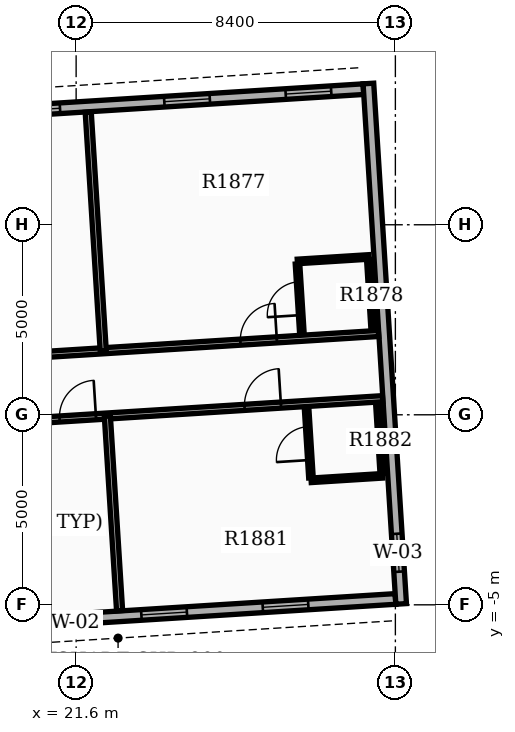
"""IFC4 building model, lengths in metres.
Left out: names, types, materials, properties, quantities, classifications, styles, units other than length and angle.
Written with IfcOpenShell. Run it as: python <this file> out.ifc"""

import sys

from ifc_helpers import new_model, si_unit, direction, frame, frame_2d, origin, place, context, subcontext, project, spatial, rectangle, extrude, element, fill, save


model = new_model("IFC4")
c1 = context("Model", 3, precision=1e-05, world=origin(), true_north=direction((0.0, 1.0)))
c2 = subcontext(c1, "Body", "Model", "MODEL_VIEW")
j1 = project(units=[si_unit("LENGTHUNIT", "METRE"), si_unit("PLANEANGLEUNIT", "RADIAN")], contexts=[c1])
p1 = place(None, origin())
s1 = spatial("IfcSite", under=j1, at=p1, CompositionType="ELEMENT")
p2 = place(p1, origin())
s2 = spatial("IfcBuilding", under=s1, at=p2, CompositionType="ELEMENT")
p3 = place(p2, frame((0.0, 0.0, 120.3)))
s3 = spatial("IfcBuildingStorey", under=s2, at=p3, CompositionType="ELEMENT", Elevation=120.3)
p4 = place(p3, frame((15.333, -5.769, 0.0), z_axis=(0.0, 0.0, 1.0), x_axis=(0.998027423805, 0.062779465852, 0.0)))
e1 = element("IfcWall", 1, at=p4, inside=s3, PredefinedType="STANDARD", context=c2, shape_type="SweptSolid", body=[
    extrude(rectangle(XDim=14.7, YDim=0.28, at=frame_2d((7.35, 0.0))), origin(), (0.0, 0.0, 1.0), 2.97),
])
p5 = place(p4, frame((4.05, 0.0, 0.8)))
e2 = element("IfcOpeningElement", 2, at=p5, cuts=e1, PredefinedType="OPENING", context=c2, shape_type="SweptSolid", body=[
    extrude(rectangle(XDim=1.2, YDim=1.6, at=frame_2d((0.6, 0.8))), frame((0.0, 0.15, 0.0), z_axis=(0.0, -1.0, 0.0), x_axis=(1.0, 0.0, 0.0)), (0.0, 0.0, 1.0), 0.3),
])
p6 = place(p4, frame((8.0, 0.0, 0.8)))
e3 = element("IfcOpeningElement", 3, at=p6, cuts=e1, PredefinedType="OPENING", context=c2, shape_type="SweptSolid", body=[
    extrude(rectangle(XDim=1.2, YDim=1.6, at=frame_2d((0.6, 0.8))), frame((0.0, 0.15, 0.0), z_axis=(0.0, -1.0, 0.0), x_axis=(1.0, 0.0, 0.0)), (0.0, 0.0, 1.0), 0.3),
])
p7 = place(p4, frame((11.2, 0.0, 0.8)))
e4 = element("IfcOpeningElement", 4, at=p7, cuts=e1, PredefinedType="OPENING", context=c2, shape_type="SweptSolid", body=[
    extrude(rectangle(XDim=1.2, YDim=1.6, at=frame_2d((0.6, 0.8))), frame((0.0, 0.15, 0.0), z_axis=(0.0, -1.0, 0.0), x_axis=(1.0, 0.0, 0.0)), (0.0, 0.0, 1.0), 0.3),
])
p8 = place(p4, frame((0.3, 0.0, 0.0)))
e5 = element("IfcOpeningElement", 5, at=p8, cuts=e1, PredefinedType="OPENING", context=c2, shape_type="SweptSolid", body=[
    extrude(rectangle(XDim=0.96, YDim=2.1, at=frame_2d((0.48, 1.05))), frame((0.0, 0.15, 0.0), z_axis=(0.0, -1.0, 0.0), x_axis=(1.0, 0.0, 0.0)), (0.0, 0.0, 1.0), 0.3),
])
p9 = place(p3, frame((29.16, 8.568, 0.0), z_axis=(0.0, 0.0, 1.0), x_axis=(-0.998026448555, -0.062794967833, 0.0)))
e6 = element("IfcWall", 6, at=p9, inside=s3, PredefinedType="STANDARD", context=c2, shape_type="SweptSolid", body=[
    extrude(rectangle(XDim=14.7, YDim=0.28, at=frame_2d((7.35, 0.0))), origin(), (0.0, 0.0, 1.0), 2.97),
])
p10 = place(p9, frame((0.85, 0.0, 0.8)))
e7 = element("IfcOpeningElement", 7, at=p10, cuts=e6, PredefinedType="OPENING", context=c2, shape_type="SweptSolid", body=[
    extrude(rectangle(XDim=1.2, YDim=1.6, at=frame_2d((0.6, 0.8))), frame((0.0, 0.15, 0.0), z_axis=(0.0, -1.0, 0.0), x_axis=(1.0, 0.0, 0.0)), (0.0, 0.0, 1.0), 0.3),
])
p11 = place(p9, frame((4.05, 0.0, 0.8)))
e8 = element("IfcOpeningElement", 8, at=p11, cuts=e6, PredefinedType="OPENING", context=c2, shape_type="SweptSolid", body=[
    extrude(rectangle(XDim=1.2, YDim=1.6, at=frame_2d((0.6, 0.8))), frame((0.0, 0.15, 0.0), z_axis=(0.0, -1.0, 0.0), x_axis=(1.0, 0.0, 0.0)), (0.0, 0.0, 1.0), 0.3),
])
p12 = place(p9, frame((8.0, 0.0, 0.8)))
e9 = element("IfcOpeningElement", 9, at=p12, cuts=e6, PredefinedType="OPENING", context=c2, shape_type="SweptSolid", body=[
    extrude(rectangle(XDim=1.2, YDim=1.6, at=frame_2d((0.6, 0.8))), frame((0.0, 0.15, 0.0), z_axis=(0.0, -1.0, 0.0), x_axis=(1.0, 0.0, 0.0)), (0.0, 0.0, 1.0), 0.3),
])
p13 = place(p9, frame((11.2, 0.0, 0.8)))
e10 = element("IfcOpeningElement", 10, at=p13, cuts=e6, PredefinedType="OPENING", context=c2, shape_type="SweptSolid", body=[
    extrude(rectangle(XDim=1.2, YDim=1.6, at=frame_2d((0.6, 0.8))), frame((0.0, 0.15, 0.0), z_axis=(0.0, -1.0, 0.0), x_axis=(1.0, 0.0, 0.0)), (0.0, 0.0, 1.0), 0.3),
])
p14 = place(p3, frame((30.152, -4.977, 0.0), z_axis=(0.0, 0.0, 1.0), x_axis=(-0.062797041623, 0.998026318072, 0.0)))
e11 = element("IfcWall", 11, at=p14, inside=s3, PredefinedType="STANDARD", context=c2, shape_type="SweptSolid", body=[
    extrude(rectangle(XDim=13.72, YDim=0.28, at=frame_2d((6.86, 0.0))), origin(), (0.0, 0.0, 1.0), 2.97),
])
p15 = place(p14, frame((0.85, 0.0, 0.85)))
e12 = element("IfcOpeningElement", 12, at=p15, cuts=e11, PredefinedType="OPENING", context=c2, shape_type="SweptSolid", body=[
    extrude(rectangle(XDim=1.0, YDim=1.5, at=frame_2d((0.5, 0.75))), frame((0.0, 0.15, 0.0), z_axis=(0.0, -1.0, 0.0), x_axis=(1.0, 0.0, 0.0)), (0.0, 0.0, 1.0), 0.3),
])
p16 = place(p3, frame((14.803, 1.212, 0.0), z_axis=(0.0, 0.0, 1.0), x_axis=(0.998027564116, 0.062777235242, 0.0)))
e13 = element("IfcWall", 13, at=p16, inside=s3, PredefinedType="PARTITIONING", context=c2, shape_type="SweptSolid", body=[
    extrude(rectangle(XDim=14.782, YDim=0.16, at=frame_2d((7.391, 0.0))), origin(), (0.0, 0.0, 1.0), 2.96),
])
p17 = place(p16, frame((2.733, 0.0, 0.0)))
e14 = element("IfcOpeningElement", 14, at=p17, cuts=e13, PredefinedType="OPENING", context=c2, shape_type="SweptSolid", body=[
    extrude(rectangle(XDim=0.96, YDim=2.15, at=frame_2d((0.48, 1.075))), frame((0.0, 0.09, 0.0), z_axis=(0.0, -1.0, 0.0), x_axis=(1.0, 0.0, 0.0)), (0.0, 0.0, 1.0), 0.18),
])
p18 = place(p16, frame((11.142, 0.0, 0.0)))
e15 = element("IfcOpeningElement", 15, at=p18, cuts=e13, PredefinedType="OPENING", context=c2, shape_type="SweptSolid", body=[
    extrude(rectangle(XDim=0.96, YDim=2.15, at=frame_2d((0.48, 1.075))), frame((0.0, 0.09, 0.0), z_axis=(0.0, -1.0, 0.0), x_axis=(1.0, 0.0, 0.0)), (0.0, 0.0, 1.0), 0.18),
])
p19 = place(p3, frame((22.313, 1.684, 0.0), z_axis=(0.0, 0.0, 1.0), x_axis=(-0.062779270337, 0.998027436104, 0.0)))
e16 = element("IfcWall", 16, at=p19, inside=s3, PredefinedType="PARTITIONING", context=c2, shape_type="SweptSolid", body=[
    extrude(rectangle(XDim=6.292, YDim=0.16, at=frame_2d((3.146, 0.0))), origin(), (0.0, 0.0, 1.0), 2.96),
])
p20 = place(p3, frame((27.539, 2.153, 0.0), z_axis=(0.0, 0.0, 1.0), x_axis=(-0.062770741989, 0.998027972529, 0.0)))
e17 = element("IfcWall", 17, at=p20, inside=s3, PredefinedType="PARTITIONING", context=c2, shape_type="SweptSolid", body=[
    extrude(rectangle(XDim=1.82, YDim=0.12, at=frame_2d((0.91, 0.0))), origin(), (0.0, 0.0, 1.0), 2.96),
])
p21 = place(p20, frame((0.47, 0.0, 0.0)))
e18 = element("IfcOpeningElement", 18, at=p21, cuts=e17, PredefinedType="OPENING", context=c2, shape_type="SweptSolid", body=[
    extrude(rectangle(XDim=0.88, YDim=2.1, at=frame_2d((0.44, 1.05))), frame((0.0, 0.07, 0.0), z_axis=(0.0, -1.0, 0.0), x_axis=(1.0, 0.0, 0.0)), (0.0, 0.0, 1.0), 0.14),
])
p22 = place(p3, frame((29.415, 2.271, 0.0), z_axis=(0.0, 0.0, 1.0), x_axis=(-0.062779145668, 0.998027443946, 0.0)))
e19 = element("IfcWall", 19, at=p22, inside=s3, PredefinedType="PARTITIONING", context=c2, shape_type="SweptSolid", body=[
    extrude(rectangle(XDim=1.82, YDim=0.12, at=frame_2d((0.91, 0.0))), origin(), (0.0, 0.0, 1.0), 2.96),
])
p23 = place(p3, frame((27.421, 4.035, 0.0), z_axis=(0.0, 0.0, 1.0), x_axis=(0.998022650819, 0.062855297722, 0.0)))
e20 = element("IfcWall", 20, at=p23, inside=s3, PredefinedType="PARTITIONING", context=c2, shape_type="SweptSolid", body=[
    extrude(rectangle(XDim=1.88, YDim=0.12, at=frame_2d((0.94, 0.0))), origin(), (0.0, 0.0, 1.0), 2.96),
])
p24 = place(p3, frame((14.911, -0.505, 0.0), z_axis=(0.0, 0.0, 1.0), x_axis=(0.998027564116, 0.062777235242, 0.0)))
e21 = element("IfcWall", 21, at=p24, inside=s3, PredefinedType="PARTITIONING", context=c2, shape_type="SweptSolid", body=[
    extrude(rectangle(XDim=14.782, YDim=0.16, at=frame_2d((7.391, 0.0))), origin(), (0.0, 0.0, 1.0), 2.96),
])
p25 = place(p24, frame((6.265, 0.0, 0.0)))
e22 = element("IfcOpeningElement", 22, at=p25, cuts=e21, PredefinedType="OPENING", context=c2, shape_type="SweptSolid", body=[
    extrude(rectangle(XDim=0.96, YDim=2.15, at=frame_2d((0.48, 1.075))), frame((0.0, 0.09, 0.0), z_axis=(0.0, -1.0, 0.0), x_axis=(1.0, 0.0, 0.0)), (0.0, 0.0, 1.0), 0.18),
])
p26 = place(p24, frame((11.142, 0.0, 0.0)))
e23 = element("IfcOpeningElement", 23, at=p26, cuts=e21, PredefinedType="OPENING", context=c2, shape_type="SweptSolid", body=[
    extrude(rectangle(XDim=0.96, YDim=2.15, at=frame_2d((0.48, 1.075))), frame((0.0, 0.09, 0.0), z_axis=(0.0, -1.0, 0.0), x_axis=(1.0, 0.0, 0.0)), (0.0, 0.0, 1.0), 0.18),
])
p27 = place(p3, frame((22.421, -0.032, 0.0), z_axis=(0.0, 0.0, 1.0), x_axis=(0.062748498058, -0.998029371307, 0.0)))
e24 = element("IfcWall", 24, at=p27, inside=s3, PredefinedType="PARTITIONING", context=c2, shape_type="SweptSolid", body=[
    extrude(rectangle(XDim=5.132, YDim=0.16, at=frame_2d((2.566, 0.0))), origin(), (0.0, 0.0, 1.0), 2.96),
])
p28 = place(p3, frame((27.779, -1.659, 0.0), z_axis=(0.0, 0.0, 1.0), x_axis=(-0.062779145668, 0.998027443946, 0.0)))
e25 = element("IfcWall", 25, at=p28, inside=s3, PredefinedType="PARTITIONING", context=c2, shape_type="SweptSolid", body=[
    extrude(rectangle(XDim=1.82, YDim=0.12, at=frame_2d((0.91, 0.0))), origin(), (0.0, 0.0, 1.0), 2.96),
])
p29 = place(p28, frame((0.47, 0.0, 0.0)))
e26 = element("IfcOpeningElement", 26, at=p29, cuts=e25, PredefinedType="OPENING", context=c2, shape_type="SweptSolid", body=[
    extrude(rectangle(XDim=0.88, YDim=2.1, at=frame_2d((0.44, 1.05))), frame((0.0, 0.07, 0.0), z_axis=(0.0, -1.0, 0.0), x_axis=(1.0, 0.0, 0.0)), (0.0, 0.0, 1.0), 0.14),
])
p30 = place(p3, frame((29.655, -1.541, 0.0), z_axis=(0.0, 0.0, 1.0), x_axis=(-0.062779145668, 0.998027443946, 0.0)))
e27 = element("IfcWall", 27, at=p30, inside=s3, PredefinedType="PARTITIONING", context=c2, shape_type="SweptSolid", body=[
    extrude(rectangle(XDim=1.82, YDim=0.12, at=frame_2d((0.91, 0.0))), origin(), (0.0, 0.0, 1.0), 2.96),
])
p31 = place(p3, frame((27.783, -1.724, 0.0), z_axis=(0.0, 0.0, 1.0), x_axis=(0.998022650819, 0.062855297722, 0.0)))
e28 = element("IfcWall", 28, at=p31, inside=s3, PredefinedType="PARTITIONING", context=c2, shape_type="SweptSolid", body=[
    extrude(rectangle(XDim=1.88, YDim=0.12, at=frame_2d((0.94, 0.0))), origin(), (0.0, 0.0, 1.0), 2.96),
])
p32 = place(p6, origin())
e29 = element("IfcWindow", 29, at=p32, inside=s3, PartitioningType="SINGLE_PANEL", PredefinedType="WINDOW", context=c2, shape_type="SweptSolid", body=[
    extrude(rectangle(XDim=1.2, YDim=1.6, at=frame_2d((0.6, 0.8))), frame((0.0, 0.03, 0.0), z_axis=(0.0, -1.0, 0.0), x_axis=(1.0, 0.0, 0.0)), (0.0, 0.0, 1.0), 0.06),
])
fill(e3, e29)
p33 = place(p7, origin())
e30 = element("IfcWindow", 30, at=p33, inside=s3, PartitioningType="SINGLE_PANEL", PredefinedType="WINDOW", context=c2, shape_type="SweptSolid", body=[
    extrude(rectangle(XDim=1.2, YDim=1.6, at=frame_2d((0.6, 0.8))), frame((0.0, 0.03, 0.0), z_axis=(0.0, -1.0, 0.0), x_axis=(1.0, 0.0, 0.0)), (0.0, 0.0, 1.0), 0.06),
])
fill(e4, e30)
p34 = place(p10, origin())
e31 = element("IfcWindow", 31, at=p34, inside=s3, PartitioningType="SINGLE_PANEL", PredefinedType="WINDOW", context=c2, shape_type="SweptSolid", body=[
    extrude(rectangle(XDim=1.2, YDim=1.6, at=frame_2d((0.6, 0.8))), frame((0.0, 0.03, 0.0), z_axis=(0.0, -1.0, 0.0), x_axis=(1.0, 0.0, 0.0)), (0.0, 0.0, 1.0), 0.06),
])
fill(e7, e31)
p35 = place(p11, origin())
e32 = element("IfcWindow", 32, at=p35, inside=s3, PartitioningType="SINGLE_PANEL", PredefinedType="WINDOW", context=c2, shape_type="SweptSolid", body=[
    extrude(rectangle(XDim=1.2, YDim=1.6, at=frame_2d((0.6, 0.8))), frame((0.0, 0.03, 0.0), z_axis=(0.0, -1.0, 0.0), x_axis=(1.0, 0.0, 0.0)), (0.0, 0.0, 1.0), 0.06),
])
fill(e8, e32)
p36 = place(p12, origin())
e33 = element("IfcWindow", 33, at=p36, inside=s3, PartitioningType="SINGLE_PANEL", PredefinedType="WINDOW", context=c2, shape_type="SweptSolid", body=[
    extrude(rectangle(XDim=1.2, YDim=1.6, at=frame_2d((0.6, 0.8))), frame((0.0, 0.03, 0.0), z_axis=(0.0, -1.0, 0.0), x_axis=(1.0, 0.0, 0.0)), (0.0, 0.0, 1.0), 0.06),
])
fill(e9, e33)
p37 = place(p15, origin())
e34 = element("IfcWindow", 34, at=p37, inside=s3, PartitioningType="SINGLE_PANEL", PredefinedType="WINDOW", context=c2, shape_type="SweptSolid", body=[
    extrude(rectangle(XDim=1.0, YDim=1.5, at=frame_2d((0.5, 0.75))), frame((0.0, 0.03, 0.0), z_axis=(0.0, -1.0, 0.0), x_axis=(1.0, 0.0, 0.0)), (0.0, 0.0, 1.0), 0.06),
])
fill(e12, e34)
p38 = place(p18, origin())
e35 = element("IfcDoor", 35, at=p38, inside=s3, OperationType="SINGLE_SWING_RIGHT", PredefinedType="DOOR", context=c2, shape_type="SweptSolid", body=[
    extrude(rectangle(XDim=0.96, YDim=2.15, at=frame_2d((0.48, 1.075))), frame((0.0, 0.025, 0.0), z_axis=(0.0, -1.0, 0.0), x_axis=(1.0, 0.0, 0.0)), (0.0, 0.0, 1.0), 0.05),
])
fill(e15, e35)
p39 = place(p21, origin())
e36 = element("IfcDoor", 36, at=p39, inside=s3, OperationType="SINGLE_SWING_LEFT", PredefinedType="DOOR", context=c2, shape_type="SweptSolid", body=[
    extrude(rectangle(XDim=0.88, YDim=2.1, at=frame_2d((0.44, 1.05))), frame((0.0, 0.025, 0.0), z_axis=(0.0, -1.0, 0.0), x_axis=(1.0, 0.0, 0.0)), (0.0, 0.0, 1.0), 0.05),
])
fill(e18, e36)
p40 = place(p25, origin())
e37 = element("IfcDoor", 37, at=p40, inside=s3, OperationType="SINGLE_SWING_RIGHT", PredefinedType="DOOR", context=c2, shape_type="SweptSolid", body=[
    extrude(rectangle(XDim=0.96, YDim=2.15, at=frame_2d((0.48, 1.075))), frame((0.0, 0.025, 0.0), z_axis=(0.0, -1.0, 0.0), x_axis=(1.0, 0.0, 0.0)), (0.0, 0.0, 1.0), 0.05),
])
fill(e22, e37)
p41 = place(p26, origin())
e38 = element("IfcDoor", 38, at=p41, inside=s3, OperationType="SINGLE_SWING_RIGHT", PredefinedType="DOOR", context=c2, shape_type="SweptSolid", body=[
    extrude(rectangle(XDim=0.96, YDim=2.15, at=frame_2d((0.48, 1.075))), frame((0.0, 0.025, 0.0), z_axis=(0.0, -1.0, 0.0), x_axis=(1.0, 0.0, 0.0)), (0.0, 0.0, 1.0), 0.05),
])
fill(e23, e38)
p42 = place(p29, origin())
e39 = element("IfcDoor", 39, at=p42, inside=s3, OperationType="SINGLE_SWING_LEFT", PredefinedType="DOOR", context=c2, shape_type="SweptSolid", body=[
    extrude(rectangle(XDim=0.88, YDim=2.1, at=frame_2d((0.44, 1.05))), frame((0.0, 0.025, 0.0), z_axis=(0.0, -1.0, 0.0), x_axis=(1.0, 0.0, 0.0)), (0.0, 0.0, 1.0), 0.05),
])
fill(e26, e39)
save(model, sys.argv[1])
